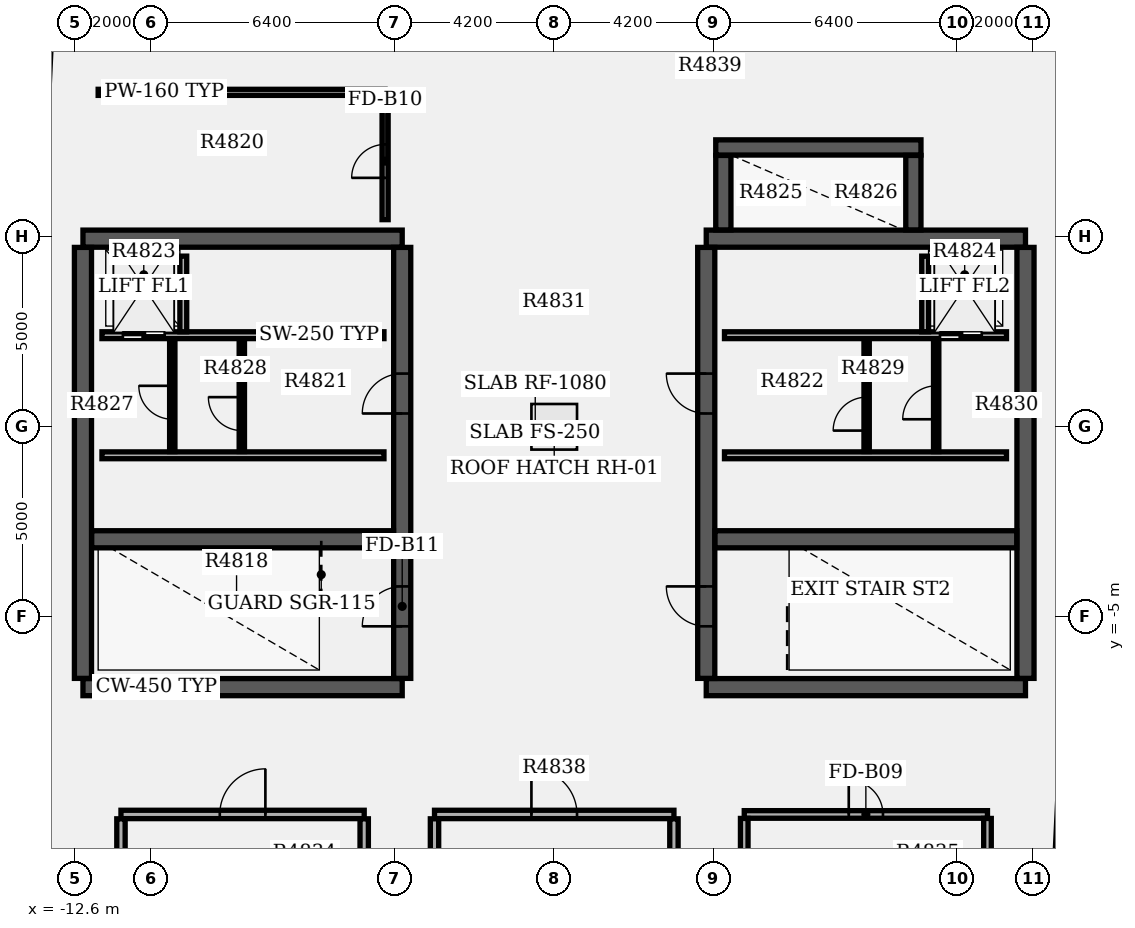
"""IFC4 building model, lengths in metres.
Left out: names, types, materials, properties, quantities, classifications, styles, units other than length and angle.
Written with IfcOpenShell. Run it as: python <this file> out.ifc"""

import sys

from ifc_helpers import new_model, si_unit, direction, frame, frame_2d, origin, origin_2d, place, context, subcontext, project, spatial, rectangle, extrude, element, fill, save


model = new_model("IFC4")
c1 = context("Model", 3, precision=1e-05, world=origin(), true_north=direction((0.0, 1.0)))
c2 = subcontext(c1, "Body", "Model", "MODEL_VIEW")
j1 = project(units=[si_unit("LENGTHUNIT", "METRE"), si_unit("PLANEANGLEUNIT", "RADIAN")], contexts=[c1])
p1 = place(None, origin())
s1 = spatial("IfcSite", under=j1, at=p1, CompositionType="ELEMENT")
p2 = place(p1, origin())
s2 = spatial("IfcBuilding", under=s1, at=p2, CompositionType="ELEMENT")
p3 = place(p2, frame((0.0, 0.0, 321.9)))
s3 = spatial("IfcBuildingStorey", under=s2, at=p3, CompositionType="ELEMENT", Elevation=321.9)
for number, where, z_axis, x_axis in (
    (1, (-12.4, -6.85, 0.0), (0.0, 0.0, 1.0), (1.0, 0.0, 0.0)),
    (2, (-12.4, 4.95, 0.0), (0.0, 0.0, 1.0), (1.0, 0.0, 0.0)),
):
    element("IfcWall", number, at=place(p3, frame(where, z_axis=z_axis, x_axis=x_axis)), inside=s3, PredefinedType="SHEAR", context=c2, shape_type="SweptSolid", body=[
        extrude(rectangle(XDim=8.4, YDim=0.45, at=frame_2d((4.2, 0.0))), origin(), (0.0, 0.0, 1.0), 4.12),
    ])
p4 = place(p3, frame((-12.4, -6.62, 0.0), z_axis=(0.0, 0.0, 1.0), x_axis=(0.0, 1.0, 0.0)))
e3 = element("IfcWall", 3, at=p4, inside=s3, PredefinedType="SHEAR", context=c2, shape_type="SweptSolid", body=[
    extrude(rectangle(XDim=11.34, YDim=0.45, at=frame_2d((5.67, 0.0))), origin(), (0.0, 0.0, 1.0), 4.12),
])
p5 = place(p3, frame((-4.0, -6.62, 0.0), z_axis=(0.0, 0.0, 1.0), x_axis=(0.0, 1.0, 0.0)))
e4 = element("IfcWall", 4, at=p5, inside=s3, PredefinedType="SHEAR", context=c2, shape_type="SweptSolid", body=[
    extrude(rectangle(XDim=11.34, YDim=0.45, at=frame_2d((5.67, 0.0))), origin(), (0.0, 0.0, 1.0), 4.12),
])
p6 = place(p5, frame((1.37, 0.0, 0.0)))
e5 = element("IfcOpeningElement", 5, at=p6, cuts=e4, PredefinedType="OPENING", context=c2, shape_type="SweptSolid", body=[
    extrude(rectangle(XDim=1.05, YDim=2.15, at=frame_2d((0.525, 1.075))), frame((0.0, 0.235, 0.0), z_axis=(0.0, -1.0, 0.0), x_axis=(1.0, 0.0, 0.0)), (0.0, 0.0, 1.0), 0.47),
])
p7 = place(p5, frame((6.97, 0.0, 0.0)))
e6 = element("IfcOpeningElement", 6, at=p7, cuts=e4, PredefinedType="OPENING", context=c2, shape_type="SweptSolid", body=[
    extrude(rectangle(XDim=1.05, YDim=2.15, at=frame_2d((0.525, 1.075))), frame((0.0, 0.235, 0.0), z_axis=(0.0, -1.0, 0.0), x_axis=(1.0, 0.0, 0.0)), (0.0, 0.0, 1.0), 0.47),
])
p8 = place(p3, frame((-12.17, -2.96, 0.0), z_axis=(0.0, 0.0, 1.0), x_axis=(1.0, 0.0, 0.0)))
e7 = element("IfcWall", 7, at=p8, inside=s3, PredefinedType="SHEAR", context=c2, shape_type="SweptSolid", body=[
    extrude(rectangle(XDim=7.94, YDim=0.45, at=frame_2d((3.97, 0.0))), origin(), (0.0, 0.0, 1.0), 4.12),
])
for number, where, z_axis, x_axis in (
    (8, (4.0, -6.85, 0.0), (0.0, 0.0, 1.0), (1.0, 0.0, 0.0)),
    (9, (4.0, 4.95, 0.0), (0.0, 0.0, 1.0), (1.0, 0.0, 0.0)),
):
    element("IfcWall", number, at=place(p3, frame(where, z_axis=z_axis, x_axis=x_axis)), inside=s3, PredefinedType="SHEAR", context=c2, shape_type="SweptSolid", body=[
        extrude(rectangle(XDim=8.4, YDim=0.45, at=frame_2d((4.2, 0.0))), origin(), (0.0, 0.0, 1.0), 4.12),
    ])
p9 = place(p3, frame((4.0, -6.62, 0.0), z_axis=(0.0, 0.0, 1.0), x_axis=(0.0, 1.0, 0.0)))
e10 = element("IfcWall", 10, at=p9, inside=s3, PredefinedType="SHEAR", context=c2, shape_type="SweptSolid", body=[
    extrude(rectangle(XDim=11.34, YDim=0.45, at=frame_2d((5.67, 0.0))), origin(), (0.0, 0.0, 1.0), 4.12),
])
p10 = place(p9, frame((1.37, 0.0, 0.0)))
e11 = element("IfcOpeningElement", 11, at=p10, cuts=e10, PredefinedType="OPENING", context=c2, shape_type="SweptSolid", body=[
    extrude(rectangle(XDim=1.05, YDim=2.15, at=frame_2d((0.525, 1.075))), frame((0.0, 0.235, 0.0), z_axis=(0.0, -1.0, 0.0), x_axis=(1.0, 0.0, 0.0)), (0.0, 0.0, 1.0), 0.47),
])
p11 = place(p9, frame((6.97, 0.0, 0.0)))
e12 = element("IfcOpeningElement", 12, at=p11, cuts=e10, PredefinedType="OPENING", context=c2, shape_type="SweptSolid", body=[
    extrude(rectangle(XDim=1.05, YDim=2.15, at=frame_2d((0.525, 1.075))), frame((0.0, 0.235, 0.0), z_axis=(0.0, -1.0, 0.0), x_axis=(1.0, 0.0, 0.0)), (0.0, 0.0, 1.0), 0.47),
])
p12 = place(p3, frame((12.4, -6.62, 0.0), z_axis=(0.0, 0.0, 1.0), x_axis=(0.0, 1.0, 0.0)))
e13 = element("IfcWall", 13, at=p12, inside=s3, PredefinedType="SHEAR", context=c2, shape_type="SweptSolid", body=[
    extrude(rectangle(XDim=11.34, YDim=0.45, at=frame_2d((5.67, 0.0))), origin(), (0.0, 0.0, 1.0), 4.12),
])
p13 = place(p3, frame((4.23, -2.96, 0.0), z_axis=(0.0, 0.0, 1.0), x_axis=(1.0, 0.0, 0.0)))
e14 = element("IfcWall", 14, at=p13, inside=s3, PredefinedType="SHEAR", context=c2, shape_type="SweptSolid", body=[
    extrude(rectangle(XDim=7.94, YDim=0.45, at=frame_2d((3.97, 0.0))), origin(), (0.0, 0.0, 1.0), 4.12),
])
p14 = place(p3, frame((4.45, 5.18, 0.0), z_axis=(0.0, 0.0, 1.0), x_axis=(0.0, 1.0, 0.0)))
e15 = element("IfcWall", 15, at=p14, inside=s3, PredefinedType="SHEAR", context=c2, shape_type="SweptSolid", body=[
    extrude(rectangle(XDim=1.96, YDim=0.4, at=frame_2d((0.98, 0.0))), origin(), (0.0, 0.0, 1.0), 4.12),
])
p15 = place(p3, frame((4.25, 7.35, 0.0), z_axis=(0.0, 0.0, 1.0), x_axis=(1.0, 0.0, 0.0)))
e16 = element("IfcWall", 16, at=p15, inside=s3, PredefinedType="SHEAR", context=c2, shape_type="SweptSolid", body=[
    extrude(rectangle(XDim=5.4, YDim=0.4, at=frame_2d((2.7, 0.0))), origin(), (0.0, 0.0, 1.0), 4.12),
])
p16 = place(p3, frame((9.45, 5.18, 0.0), z_axis=(0.0, 0.0, 1.0), x_axis=(0.0, 1.0, 0.0)))
e17 = element("IfcWall", 17, at=p16, inside=s3, PredefinedType="SHEAR", context=c2, shape_type="SweptSolid", body=[
    extrude(rectangle(XDim=1.96, YDim=0.4, at=frame_2d((0.98, 0.0))), origin(), (0.0, 0.0, 1.0), 4.12),
])
for number, where, z_axis, x_axis in (
    (18, (-13.543, 6.19, 0.0), (0.0, 0.0, 1.0), (0.047, 0.999, 0.0)),
    (19, (13.543, -6.19, 0.0), (0.0, 0.0, 1.0), (-0.047, -0.999, 0.0)),
):
    element("IfcWall", number, at=place(p3, frame(where, z_axis=z_axis, x_axis=x_axis)), inside=s3, PredefinedType="STANDARD", context=c2, shape_type="SweptSolid", body=[
        extrude(rectangle(XDim=6.9, YDim=0.25, at=frame_2d((3.45, 0.0))), origin(), (0.0, 0.0, 1.0), 3.6),
    ])
p17 = place(p3, frame((-12.0, 8.8, 0.0), z_axis=(0.0, 0.0, 1.0), x_axis=(1.0, 0.0, 0.0)))
e20 = element("IfcWall", 20, at=p17, inside=s3, PredefinedType="PARTITIONING", context=c2, shape_type="SweptSolid", body=[
    extrude(rectangle(XDim=7.55, YDim=0.16, at=frame_2d((3.775, 0.0))), origin(), (0.0, 0.0, 1.0), 3.59),
])
p18 = place(p3, frame((-4.45, 5.45, 0.0), z_axis=(0.0, 0.0, 1.0), x_axis=(0.0, 1.0, 0.0)))
e21 = element("IfcWall", 21, at=p18, inside=s3, PredefinedType="PARTITIONING", context=c2, shape_type="SweptSolid", body=[
    extrude(rectangle(XDim=3.26, YDim=0.16, at=frame_2d((1.63, 0.0))), origin(), (0.0, 0.0, 1.0), 3.59),
])
p19 = place(p18, frame((1.1, 0.0, 0.0)))
e22 = element("IfcOpeningElement", 22, at=p19, cuts=e21, PredefinedType="OPENING", context=c2, shape_type="SweptSolid", body=[
    extrude(rectangle(XDim=0.88, YDim=2.1, at=frame_2d((0.44, 1.05))), frame((0.0, 0.09, 0.0), z_axis=(0.0, -1.0, 0.0), x_axis=(1.0, 0.0, 0.0)), (0.0, 0.0, 1.0), 0.18),
])
p20 = place(p3, frame((-11.9, 2.41, 0.0), z_axis=(0.0, 0.0, 1.0), x_axis=(1.0, 0.0, 0.0)))
e23 = element("IfcWall", 23, at=p20, inside=s3, PredefinedType="SOLIDWALL", context=c2, shape_type="SweptSolid", body=[
    extrude(rectangle(XDim=7.42, YDim=0.18, at=frame_2d((3.71, 0.0))), origin(), (0.0, 0.0, 1.0), 3.59),
])
p21 = place(p20, frame((0.55, 0.0, 0.0)))
e24 = element("IfcOpeningElement", 24, at=p21, cuts=e23, PredefinedType="OPENING", context=c2, shape_type="SweptSolid", body=[
    extrude(rectangle(XDim=1.1, YDim=2.15, at=frame_2d((0.55, 1.075))), frame((0.0, 0.1, 0.0), z_axis=(0.0, -1.0, 0.0), x_axis=(1.0, 0.0, 0.0)), (0.0, 0.0, 1.0), 0.2),
])
p22 = place(p3, frame((4.48, 2.41, 0.0), z_axis=(0.0, 0.0, 1.0), x_axis=(1.0, 0.0, 0.0)))
e25 = element("IfcWall", 25, at=p22, inside=s3, PredefinedType="SOLIDWALL", context=c2, shape_type="SweptSolid", body=[
    extrude(rectangle(XDim=7.42, YDim=0.18, at=frame_2d((3.71, 0.0))), origin(), (0.0, 0.0, 1.0), 3.59),
])
p23 = place(p22, frame((5.67, 0.0, 0.0)))
e26 = element("IfcOpeningElement", 26, at=p23, cuts=e25, PredefinedType="OPENING", context=c2, shape_type="SweptSolid", body=[
    extrude(rectangle(XDim=1.1, YDim=2.15, at=frame_2d((0.55, 1.075))), frame((0.0, 0.1, 0.0), z_axis=(0.0, -1.0, 0.0), x_axis=(1.0, 0.0, 0.0)), (0.0, 0.0, 1.0), 0.2),
])
for number, where, z_axis, x_axis in (
    (27, (-11.9, -0.75, 0.0), (0.0, 0.0, 1.0), (1.0, 0.0, 0.0)),
    (28, (4.48, -0.75, 0.0), (0.0, 0.0, 1.0), (1.0, 0.0, 0.0)),
):
    element("IfcWall", number, at=place(p3, frame(where, z_axis=z_axis, x_axis=x_axis)), inside=s3, PredefinedType="SOLIDWALL", context=c2, shape_type="SweptSolid", body=[
        extrude(rectangle(XDim=7.42, YDim=0.18, at=frame_2d((3.71, 0.0))), origin(), (0.0, 0.0, 1.0), 3.59),
    ])
for number, where, z_axis, x_axis in (
    (29, (-9.76, 2.5, 0.0), (0.0, 0.0, 1.0), (0.0, 1.0, 0.0)),
    (30, (9.76, 2.5, 0.0), (0.0, 0.0, 1.0), (0.0, 1.0, 0.0)),
):
    element("IfcWall", number, at=place(p3, frame(where, z_axis=z_axis, x_axis=x_axis)), inside=s3, PredefinedType="SOLIDWALL", context=c2, shape_type="SweptSolid", body=[
        extrude(rectangle(XDim=1.99, YDim=0.18, at=frame_2d((0.995, 0.0))), origin(), (0.0, 0.0, 1.0), 3.59),
    ])
p24 = place(p3, frame((-8.22, -0.65, 0.0), z_axis=(0.0, 0.0, 1.0), x_axis=(0.0, 1.0, 0.0)))
e31 = element("IfcWall", 31, at=p24, inside=s3, PredefinedType="SOLIDWALL", context=c2, shape_type="SweptSolid", body=[
    extrude(rectangle(XDim=2.96, YDim=0.14, at=frame_2d((1.48, 0.0))), origin(), (0.0, 0.0, 1.0), 3.59),
])
p25 = place(p24, frame((0.55, 0.0, 0.0)))
e32 = element("IfcOpeningElement", 32, at=p25, cuts=e31, PredefinedType="OPENING", context=c2, shape_type="SweptSolid", body=[
    extrude(rectangle(XDim=0.88, YDim=2.1, at=frame_2d((0.44, 1.05))), frame((0.0, 0.08, 0.0), z_axis=(0.0, -1.0, 0.0), x_axis=(1.0, 0.0, 0.0)), (0.0, 0.0, 1.0), 0.16),
])
p26 = place(p3, frame((8.22, -0.65, 0.0), z_axis=(0.0, 0.0, 1.0), x_axis=(0.0, 1.0, 0.0)))
e33 = element("IfcWall", 33, at=p26, inside=s3, PredefinedType="SOLIDWALL", context=c2, shape_type="SweptSolid", body=[
    extrude(rectangle(XDim=2.96, YDim=0.14, at=frame_2d((1.48, 0.0))), origin(), (0.0, 0.0, 1.0), 3.59),
])
p27 = place(p26, frame((0.55, 0.0, 0.0)))
e34 = element("IfcOpeningElement", 34, at=p27, cuts=e33, PredefinedType="OPENING", context=c2, shape_type="SweptSolid", body=[
    extrude(rectangle(XDim=0.88, YDim=2.1, at=frame_2d((0.44, 1.05))), frame((0.0, 0.08, 0.0), z_axis=(0.0, -1.0, 0.0), x_axis=(1.0, 0.0, 0.0)), (0.0, 0.0, 1.0), 0.16),
])
p28 = place(p3, frame((-10.05, -0.652, 0.0), z_axis=(0.0, 0.0, 1.0), x_axis=(0.0, 1.0, 0.0)))
e35 = element("IfcWall", 35, at=p28, inside=s3, PredefinedType="PARTITIONING", context=c2, shape_type="SweptSolid", body=[
    extrude(rectangle(XDim=2.962, YDim=0.14, at=frame_2d((1.481, 0.0))), origin(), (0.0, 0.0, 1.0), 3.59),
])
p29 = place(p28, frame((0.85, 0.0, 0.0)))
e36 = element("IfcOpeningElement", 36, at=p29, cuts=e35, PredefinedType="OPENING", context=c2, shape_type="SweptSolid", body=[
    extrude(rectangle(XDim=0.88, YDim=2.1, at=frame_2d((0.44, 1.05))), frame((0.0, 0.08, 0.0), z_axis=(0.0, -1.0, 0.0), x_axis=(1.0, 0.0, 0.0)), (0.0, 0.0, 1.0), 0.16),
])
p30 = place(p3, frame((10.05, -0.652, 0.0), z_axis=(0.0, 0.0, 1.0), x_axis=(0.0, 1.0, 0.0)))
e37 = element("IfcWall", 37, at=p30, inside=s3, PredefinedType="PARTITIONING", context=c2, shape_type="SweptSolid", body=[
    extrude(rectangle(XDim=2.962, YDim=0.14, at=frame_2d((1.481, 0.0))), origin(), (0.0, 0.0, 1.0), 3.59),
])
p31 = place(p30, frame((0.85, 0.0, 0.0)))
e38 = element("IfcOpeningElement", 38, at=p31, cuts=e37, PredefinedType="OPENING", context=c2, shape_type="SweptSolid", body=[
    extrude(rectangle(XDim=0.88, YDim=2.1, at=frame_2d((0.44, 1.05))), frame((0.0, 0.08, 0.0), z_axis=(0.0, -1.0, 0.0), x_axis=(1.0, 0.0, 0.0)), (0.0, 0.0, 1.0), 0.16),
])
p32 = place(p3, frame((-3.15, -10.2, 0.0), z_axis=(0.0, 0.0, 1.0), x_axis=(1.0, 0.0, 0.0)))
e39 = element("IfcWall", 39, at=p32, inside=s3, PredefinedType="PARTITIONING", context=c2, shape_type="SweptSolid", body=[
    extrude(rectangle(XDim=6.3, YDim=0.22, at=frame_2d((3.15, 0.0))), origin(), (0.0, 0.0, 1.0), 3.59),
])
p33 = place(p32, frame((2.55, 0.0, 0.0)))
e40 = element("IfcOpeningElement", 40, at=p33, cuts=e39, PredefinedType="OPENING", context=c2, shape_type="SweptSolid", body=[
    extrude(rectangle(XDim=1.2, YDim=2.15, at=frame_2d((0.6, 1.075))), frame((0.0, 0.12, 0.0), z_axis=(0.0, -1.0, 0.0), x_axis=(1.0, 0.0, 0.0)), (0.0, 0.0, 1.0), 0.24),
])
for number, where, z_axis, x_axis in (
    (41, (-3.15, -14.985, 0.0), (0.0, 0.0, 1.0), (0.0, 1.0, 0.0)),
    (42, (3.15, -14.985, 0.0), (0.0, 0.0, 1.0), (0.0, 1.0, 0.0)),
):
    element("IfcWall", number, at=place(p3, frame(where, z_axis=z_axis, x_axis=x_axis)), inside=s3, PredefinedType="PARTITIONING", context=c2, shape_type="SweptSolid", body=[
        extrude(rectangle(XDim=4.67, YDim=0.22, at=frame_2d((2.335, 0.0))), origin(), (0.0, 0.0, 1.0), 3.59),
    ])
p34 = place(p3, frame((-11.4, -10.2, 0.0), z_axis=(0.0, 0.0, 1.0), x_axis=(1.0, 0.0, 0.0)))
e43 = element("IfcWall", 43, at=p34, inside=s3, PredefinedType="PARTITIONING", context=c2, shape_type="SweptSolid", body=[
    extrude(rectangle(XDim=6.4, YDim=0.22, at=frame_2d((3.2, 0.0))), origin(), (0.0, 0.0, 1.0), 3.59),
])
p35 = place(p34, frame((2.6, 0.0, 0.0)))
e44 = element("IfcOpeningElement", 44, at=p35, cuts=e43, PredefinedType="OPENING", context=c2, shape_type="SweptSolid", body=[
    extrude(rectangle(XDim=1.2, YDim=2.15, at=frame_2d((0.6, 1.075))), frame((0.0, 0.12, 0.0), z_axis=(0.0, -1.0, 0.0), x_axis=(1.0, 0.0, 0.0)), (0.0, 0.0, 1.0), 0.24),
])
for number, where, z_axis, x_axis in (
    (45, (-11.4, -11.885, 0.0), (0.0, 0.0, 1.0), (0.0, 1.0, 0.0)),
    (46, (-5.0, -11.885, 0.0), (0.0, 0.0, 1.0), (0.0, 1.0, 0.0)),
):
    element("IfcWall", number, at=place(p3, frame(where, z_axis=z_axis, x_axis=x_axis)), inside=s3, PredefinedType="PARTITIONING", context=c2, shape_type="SweptSolid", body=[
        extrude(rectangle(XDim=1.57, YDim=0.22, at=frame_2d((0.785, 0.0))), origin(), (0.0, 0.0, 1.0), 3.59),
    ])
p36 = place(p3, frame((5.0, -10.2, 0.0), z_axis=(0.0, 0.0, 1.0), x_axis=(1.0, 0.0, 0.0)))
e47 = element("IfcWall", 47, at=p36, inside=s3, PredefinedType="PARTITIONING", context=c2, shape_type="SweptSolid", body=[
    extrude(rectangle(XDim=6.4, YDim=0.2, at=frame_2d((3.2, 0.0))), origin(), (0.0, 0.0, 1.0), 3.59),
])
p37 = place(p36, frame((2.75, 0.0, 0.0)))
e48 = element("IfcOpeningElement", 48, at=p37, cuts=e47, PredefinedType="OPENING", context=c2, shape_type="SweptSolid", body=[
    extrude(rectangle(XDim=0.9, YDim=2.15, at=frame_2d((0.45, 1.075))), frame((0.0, 0.11, 0.0), z_axis=(0.0, -1.0, 0.0), x_axis=(1.0, 0.0, 0.0)), (0.0, 0.0, 1.0), 0.22),
])
for number, where, z_axis, x_axis in (
    (49, (5.0, -11.895, 0.0), (0.0, 0.0, 1.0), (0.0, 1.0, 0.0)),
    (50, (11.4, -11.895, 0.0), (0.0, 0.0, 1.0), (0.0, 1.0, 0.0)),
):
    element("IfcWall", number, at=place(p3, frame(where, z_axis=z_axis, x_axis=x_axis)), inside=s3, PredefinedType="PARTITIONING", context=c2, shape_type="SweptSolid", body=[
        extrude(rectangle(XDim=1.59, YDim=0.2, at=frame_2d((0.795, 0.0))), origin(), (0.0, 0.0, 1.0), 3.59),
    ])
p38 = place(p3, frame((0.0, 0.0, 4.12)))
p39 = place(p38, origin())
p40 = place(p39, frame((0.0, 0.0, 1.03)))
e51 = element("IfcWindow", 51, at=p40, inside=s3, PartitioningType="SINGLE_PANEL", PredefinedType="SKYLIGHT", context=c2, shape_type="SweptSolid", body=[
    extrude(rectangle(XDim=1.2, YDim=1.2, at=origin_2d()), origin(), (0.0, 0.0, 1.0), 0.05),
])
p41 = place(p6, origin())
e52 = element("IfcDoor", 52, at=p41, inside=s3, OperationType="SINGLE_SWING_LEFT", PredefinedType="DOOR", context=c2, shape_type="SweptSolid", body=[
    extrude(rectangle(XDim=1.05, YDim=2.15, at=frame_2d((0.525, 1.075))), frame((0.0, 0.025, 0.0), z_axis=(0.0, -1.0, 0.0), x_axis=(1.0, 0.0, 0.0)), (0.0, 0.0, 1.0), 0.05),
])
fill(e5, e52)
p42 = place(p10, origin())
e53 = element("IfcDoor", 53, at=p42, inside=s3, OperationType="SINGLE_SWING_RIGHT", PredefinedType="DOOR", context=c2, shape_type="SweptSolid", body=[
    extrude(rectangle(XDim=1.05, YDim=2.15, at=frame_2d((0.525, 1.075))), frame((0.0, 0.025, 0.0), z_axis=(0.0, -1.0, 0.0), x_axis=(1.0, 0.0, 0.0)), (0.0, 0.0, 1.0), 0.05),
])
fill(e11, e53)
p43 = place(p7, origin())
e54 = element("IfcDoor", 54, at=p43, inside=s3, OperationType="SINGLE_SWING_LEFT", PredefinedType="DOOR", context=c2, shape_type="SweptSolid", body=[
    extrude(rectangle(XDim=1.05, YDim=2.15, at=frame_2d((0.525, 1.075))), frame((0.0, 0.025, 0.0), z_axis=(0.0, -1.0, 0.0), x_axis=(1.0, 0.0, 0.0)), (0.0, 0.0, 1.0), 0.05),
])
fill(e6, e54)
p44 = place(p11, origin())
e55 = element("IfcDoor", 55, at=p44, inside=s3, OperationType="SINGLE_SWING_RIGHT", PredefinedType="DOOR", context=c2, shape_type="SweptSolid", body=[
    extrude(rectangle(XDim=1.05, YDim=2.15, at=frame_2d((0.525, 1.075))), frame((0.0, 0.025, 0.0), z_axis=(0.0, -1.0, 0.0), x_axis=(1.0, 0.0, 0.0)), (0.0, 0.0, 1.0), 0.05),
])
fill(e12, e55)
p45 = place(p19, origin())
e56 = element("IfcDoor", 56, at=p45, inside=s3, OperationType="SINGLE_SWING_LEFT", PredefinedType="DOOR", context=c2, shape_type="SweptSolid", body=[
    extrude(rectangle(XDim=0.88, YDim=2.1, at=frame_2d((0.44, 1.05))), frame((0.0, 0.025, 0.0), z_axis=(0.0, -1.0, 0.0), x_axis=(1.0, 0.0, 0.0)), (0.0, 0.0, 1.0), 0.05),
])
fill(e22, e56)
p46 = place(p21, origin())
e57 = element("IfcDoor", 57, at=p46, inside=s3, OperationType="DOUBLE_DOOR_SLIDING", PredefinedType="DOOR", context=c2, shape_type="SweptSolid", body=[
    extrude(rectangle(XDim=1.1, YDim=2.15, at=frame_2d((0.55, 1.075))), frame((0.0, 0.025, 0.0), z_axis=(0.0, -1.0, 0.0), x_axis=(1.0, 0.0, 0.0)), (0.0, 0.0, 1.0), 0.05),
])
fill(e24, e57)
p47 = place(p23, origin())
e58 = element("IfcDoor", 58, at=p47, inside=s3, OperationType="DOUBLE_DOOR_SLIDING", PredefinedType="DOOR", context=c2, shape_type="SweptSolid", body=[
    extrude(rectangle(XDim=1.1, YDim=2.15, at=frame_2d((0.55, 1.075))), frame((0.0, 0.025, 0.0), z_axis=(0.0, -1.0, 0.0), x_axis=(1.0, 0.0, 0.0)), (0.0, 0.0, 1.0), 0.05),
])
fill(e26, e58)
p48 = place(p25, origin())
e59 = element("IfcDoor", 59, at=p48, inside=s3, OperationType="SINGLE_SWING_RIGHT", PredefinedType="DOOR", context=c2, shape_type="SweptSolid", body=[
    extrude(rectangle(XDim=0.88, YDim=2.1, at=frame_2d((0.44, 1.05))), frame((0.0, 0.025, 0.0), z_axis=(0.0, -1.0, 0.0), x_axis=(1.0, 0.0, 0.0)), (0.0, 0.0, 1.0), 0.05),
])
fill(e32, e59)
p49 = place(p27, origin())
e60 = element("IfcDoor", 60, at=p49, inside=s3, OperationType="SINGLE_SWING_LEFT", PredefinedType="DOOR", context=c2, shape_type="SweptSolid", body=[
    extrude(rectangle(XDim=0.88, YDim=2.1, at=frame_2d((0.44, 1.05))), frame((0.0, 0.025, 0.0), z_axis=(0.0, -1.0, 0.0), x_axis=(1.0, 0.0, 0.0)), (0.0, 0.0, 1.0), 0.05),
])
fill(e34, e60)
p50 = place(p29, origin())
e61 = element("IfcDoor", 61, at=p50, inside=s3, OperationType="SINGLE_SWING_RIGHT", PredefinedType="DOOR", context=c2, shape_type="SweptSolid", body=[
    extrude(rectangle(XDim=0.88, YDim=2.1, at=frame_2d((0.44, 1.05))), frame((0.0, 0.025, 0.0), z_axis=(0.0, -1.0, 0.0), x_axis=(1.0, 0.0, 0.0)), (0.0, 0.0, 1.0), 0.05),
])
fill(e36, e61)
p51 = place(p31, origin())
e62 = element("IfcDoor", 62, at=p51, inside=s3, OperationType="SINGLE_SWING_LEFT", PredefinedType="DOOR", context=c2, shape_type="SweptSolid", body=[
    extrude(rectangle(XDim=0.88, YDim=2.1, at=frame_2d((0.44, 1.05))), frame((0.0, 0.025, 0.0), z_axis=(0.0, -1.0, 0.0), x_axis=(1.0, 0.0, 0.0)), (0.0, 0.0, 1.0), 0.05),
])
fill(e38, e62)
p52 = place(p33, origin())
e63 = element("IfcDoor", 63, at=p52, inside=s3, OperationType="SINGLE_SWING_LEFT", PredefinedType="DOOR", context=c2, shape_type="SweptSolid", body=[
    extrude(rectangle(XDim=1.2, YDim=2.15, at=frame_2d((0.6, 1.075))), frame((0.0, 0.025, 0.0), z_axis=(0.0, -1.0, 0.0), x_axis=(1.0, 0.0, 0.0)), (0.0, 0.0, 1.0), 0.05),
])
fill(e40, e63)
p53 = place(p35, origin())
e64 = element("IfcDoor", 64, at=p53, inside=s3, OperationType="SINGLE_SWING_RIGHT", PredefinedType="DOOR", context=c2, shape_type="SweptSolid", body=[
    extrude(rectangle(XDim=1.2, YDim=2.15, at=frame_2d((0.6, 1.075))), frame((0.0, 0.025, 0.0), z_axis=(0.0, -1.0, 0.0), x_axis=(1.0, 0.0, 0.0)), (0.0, 0.0, 1.0), 0.05),
])
fill(e44, e64)
p54 = place(p37, origin())
e65 = element("IfcDoor", 65, at=p54, inside=s3, OperationType="SINGLE_SWING_LEFT", PredefinedType="DOOR", context=c2, shape_type="SweptSolid", body=[
    extrude(rectangle(XDim=0.9, YDim=2.15, at=frame_2d((0.45, 1.075))), frame((0.0, 0.025, 0.0), z_axis=(0.0, -1.0, 0.0), x_axis=(1.0, 0.0, 0.0)), (0.0, 0.0, 1.0), 0.05),
])
fill(e48, e65)
save(model, sys.argv[1])
